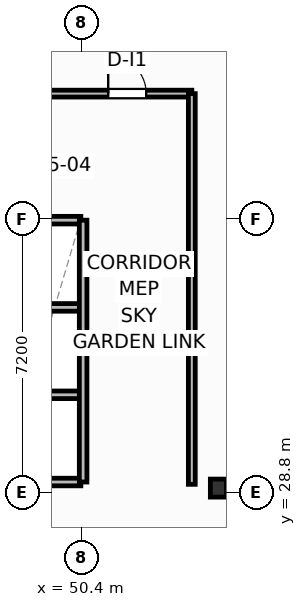
"""IFC4 building model, lengths in metres.
Left out: names, types, materials, properties, quantities, classifications, styles, units other than length and angle.
Written with IfcOpenShell. Run it as: python <this file> out.ifc"""

import sys

from ifc_helpers import new_model, si_unit, direction, frame, frame_2d, origin, origin_2d, place, context, subcontext, project, spatial, rectangle, i_section, extrude, element, fill, save


model = new_model("IFC4")
c1 = context("Model", 3, precision=1e-05, world=origin(), true_north=direction((0.0, 1.0)))
c2 = subcontext(c1, "Body", "Model", "MODEL_VIEW")
j1 = project(units=[si_unit("LENGTHUNIT", "METRE"), si_unit("PLANEANGLEUNIT", "RADIAN")], contexts=[c1])
p1 = place(None, origin())
s1 = spatial("IfcSite", under=j1, at=p1, CompositionType="ELEMENT")
p2 = place(p1, origin())
s2 = spatial("IfcBuilding", under=s1, at=p2, CompositionType="ELEMENT")
p3 = place(p2, frame((0.0, 0.0, 71.4)))
s3 = spatial("IfcBuildingStorey", under=s2, at=p3, CompositionType="ELEMENT", Elevation=71.4)
p4 = place(p3, frame((54.0, 28.92, 0.0), z_axis=(0.0, 0.0, 1.0), x_axis=(1.0, 0.0, 0.0)))
e1 = element("IfcColumn", 1, at=p4, inside=s3, PredefinedType="COLUMN", context=c2, shape_type="SweptSolid", body=[
    extrude(i_section(OverallWidth=0.424, OverallDepth=0.474, WebThickness=0.048, FlangeThickness=0.077, FilletRadius=0.025, at=origin_2d()), origin(), (0.0, 0.0, 1.0), 4.8),
])
p5 = place(p3, frame((18.646, 55.739, 0.0), z_axis=(0.0, 0.0, 1.0), x_axis=(0.935222250741, -0.354061211825, 0.0)))
e2 = element("IfcWall", 2, at=p5, inside=s3, PredefinedType="SOLIDWALL", context=c2, shape_type="SweptSolid", body=[
    extrude(rectangle(XDim=60.0, YDim=0.22, at=frame_2d((30.0, 0.0))), origin(), (0.0, 0.0, 1.0), 3.83),
])
p6 = place(p5, frame((27.647, 0.0, 0.0)))
e3 = element("IfcOpeningElement", 3, at=p6, cuts=e2, PredefinedType="OPENING", context=c2, shape_type="SweptSolid", body=[
    extrude(rectangle(XDim=1.85, YDim=2.3, at=frame_2d((0.925, 1.15))), frame((0.0, 0.12, 0.0), z_axis=(0.0, -1.0, 0.0), x_axis=(1.0, 0.0, 0.0)), (0.0, 0.0, 1.0), 0.24),
])
p7 = place(p5, frame((0.55, 0.0, 0.75)))
e4 = element("IfcOpeningElement", 4, at=p7, cuts=e2, PredefinedType="OPENING", context=c2, shape_type="SweptSolid", body=[
    extrude(rectangle(XDim=1.65, YDim=1.65, at=frame_2d((0.825, 0.825))), frame((0.0, 0.12, 0.0), z_axis=(0.0, -1.0, 0.0), x_axis=(1.0, 0.0, 0.0)), (0.0, 0.0, 1.0), 0.24),
])
p8 = place(p5, frame((57.8, 0.0, 0.75)))
e5 = element("IfcOpeningElement", 5, at=p8, cuts=e2, PredefinedType="OPENING", context=c2, shape_type="SweptSolid", body=[
    extrude(rectangle(XDim=1.65, YDim=1.65, at=frame_2d((0.825, 0.825))), frame((0.0, 0.12, 0.0), z_axis=(0.0, -1.0, 0.0), x_axis=(1.0, 0.0, 0.0)), (0.0, 0.0, 1.0), 0.24),
])
p9 = place(p3, frame((20.0, 39.3, 0.0), z_axis=(0.0, 0.0, 1.0), x_axis=(1.0, 0.0, 0.0)))
e6 = element("IfcWall", 6, at=p9, inside=s3, PredefinedType="PARTITIONING", context=c2, shape_type="SweptSolid", body=[
    extrude(rectangle(XDim=33.3, YDim=0.18, at=frame_2d((16.65, 0.0))), origin(), (0.0, 0.0, 1.0), 3.68),
])
p10 = place(p9, frame((31.1, 0.0, 0.0)))
e7 = element("IfcOpeningElement", 7, at=p10, cuts=e6, PredefinedType="OPENING", context=c2, shape_type="SweptSolid", body=[
    extrude(rectangle(XDim=1.0, YDim=2.05, at=frame_2d((0.5, 1.025))), frame((0.0, 0.1, 0.0), z_axis=(0.0, -1.0, 0.0), x_axis=(1.0, 0.0, 0.0)), (0.0, 0.0, 1.0), 0.2),
])
p11 = place(p3, frame((53.3, 29.02, 0.0), z_axis=(0.0, 0.0, 1.0), x_axis=(0.0, 1.0, 0.0)))
e8 = element("IfcWall", 8, at=p11, inside=s3, PredefinedType="PARTITIONING", context=c2, shape_type="SweptSolid", body=[
    extrude(rectangle(XDim=10.28, YDim=0.18, at=frame_2d((5.14, 0.0))), origin(), (0.0, 0.0, 1.0), 4.55),
])
for number, where, z_axis, x_axis in (
    (9, (48.32, 31.375, 0.0), (0.0, 0.0, 1.0), (1.0, 0.0, 0.0)),
    (10, (48.32, 33.675, 0.0), (0.0, 0.0, 1.0), (1.0, 0.0, 0.0)),
):
    element("IfcWall", number, at=place(p3, frame(where, z_axis=z_axis, x_axis=x_axis)), inside=s3, PredefinedType="PARTITIONING", context=c2, shape_type="SweptSolid", body=[
        extrude(rectangle(XDim=2.06, YDim=0.2, at=frame_2d((1.03, 0.0))), origin(), (0.0, 0.0, 1.0), 4.55),
    ])
p12 = place(p3, frame((48.32, 29.08, 0.0), z_axis=(0.0, 0.0, 1.0), x_axis=(1.0, 0.0, 0.0)))
e11 = element("IfcWall", 11, at=p12, inside=s3, PredefinedType="PARTITIONING", context=c2, shape_type="SweptSolid", body=[
    extrude(rectangle(XDim=2.06, YDim=0.2, at=frame_2d((1.03, 0.0))), origin(), (0.0, 0.0, 1.0), 3.762),
])
p13 = place(p3, frame((48.32, 35.97, 0.0), z_axis=(0.0, 0.0, 1.0), x_axis=(1.0, 0.0, 0.0)))
e12 = element("IfcWall", 12, at=p13, inside=s3, PredefinedType="PARTITIONING", context=c2, shape_type="SweptSolid", body=[
    extrude(rectangle(XDim=2.06, YDim=0.2, at=frame_2d((1.03, 0.0))), origin(), (0.0, 0.0, 1.0), 4.55),
])
p14 = place(p3, frame((50.44, 29.08, 0.0), z_axis=(0.0, 0.0, 1.0), x_axis=(0.0, 1.0, 0.0)))
e13 = element("IfcWall", 13, at=p14, inside=s3, PredefinedType="PARTITIONING", context=c2, shape_type="SweptSolid", body=[
    extrude(rectangle(XDim=6.89, YDim=0.2, at=frame_2d((3.445, 0.0))), origin(), (0.0, 0.0, 1.0), 4.55),
])
p15 = place(p10, origin())
e14 = element("IfcDoor", 14, at=p15, inside=s3, OperationType="SINGLE_SWING_LEFT", PredefinedType="DOOR", context=c2, shape_type="SweptSolid", body=[
    extrude(rectangle(XDim=1.0, YDim=2.05, at=frame_2d((0.5, 1.025))), frame((0.0, 0.025, 0.0), z_axis=(0.0, -1.0, 0.0), x_axis=(1.0, 0.0, 0.0)), (0.0, 0.0, 1.0), 0.05),
])
fill(e7, e14)
save(model, sys.argv[1])
